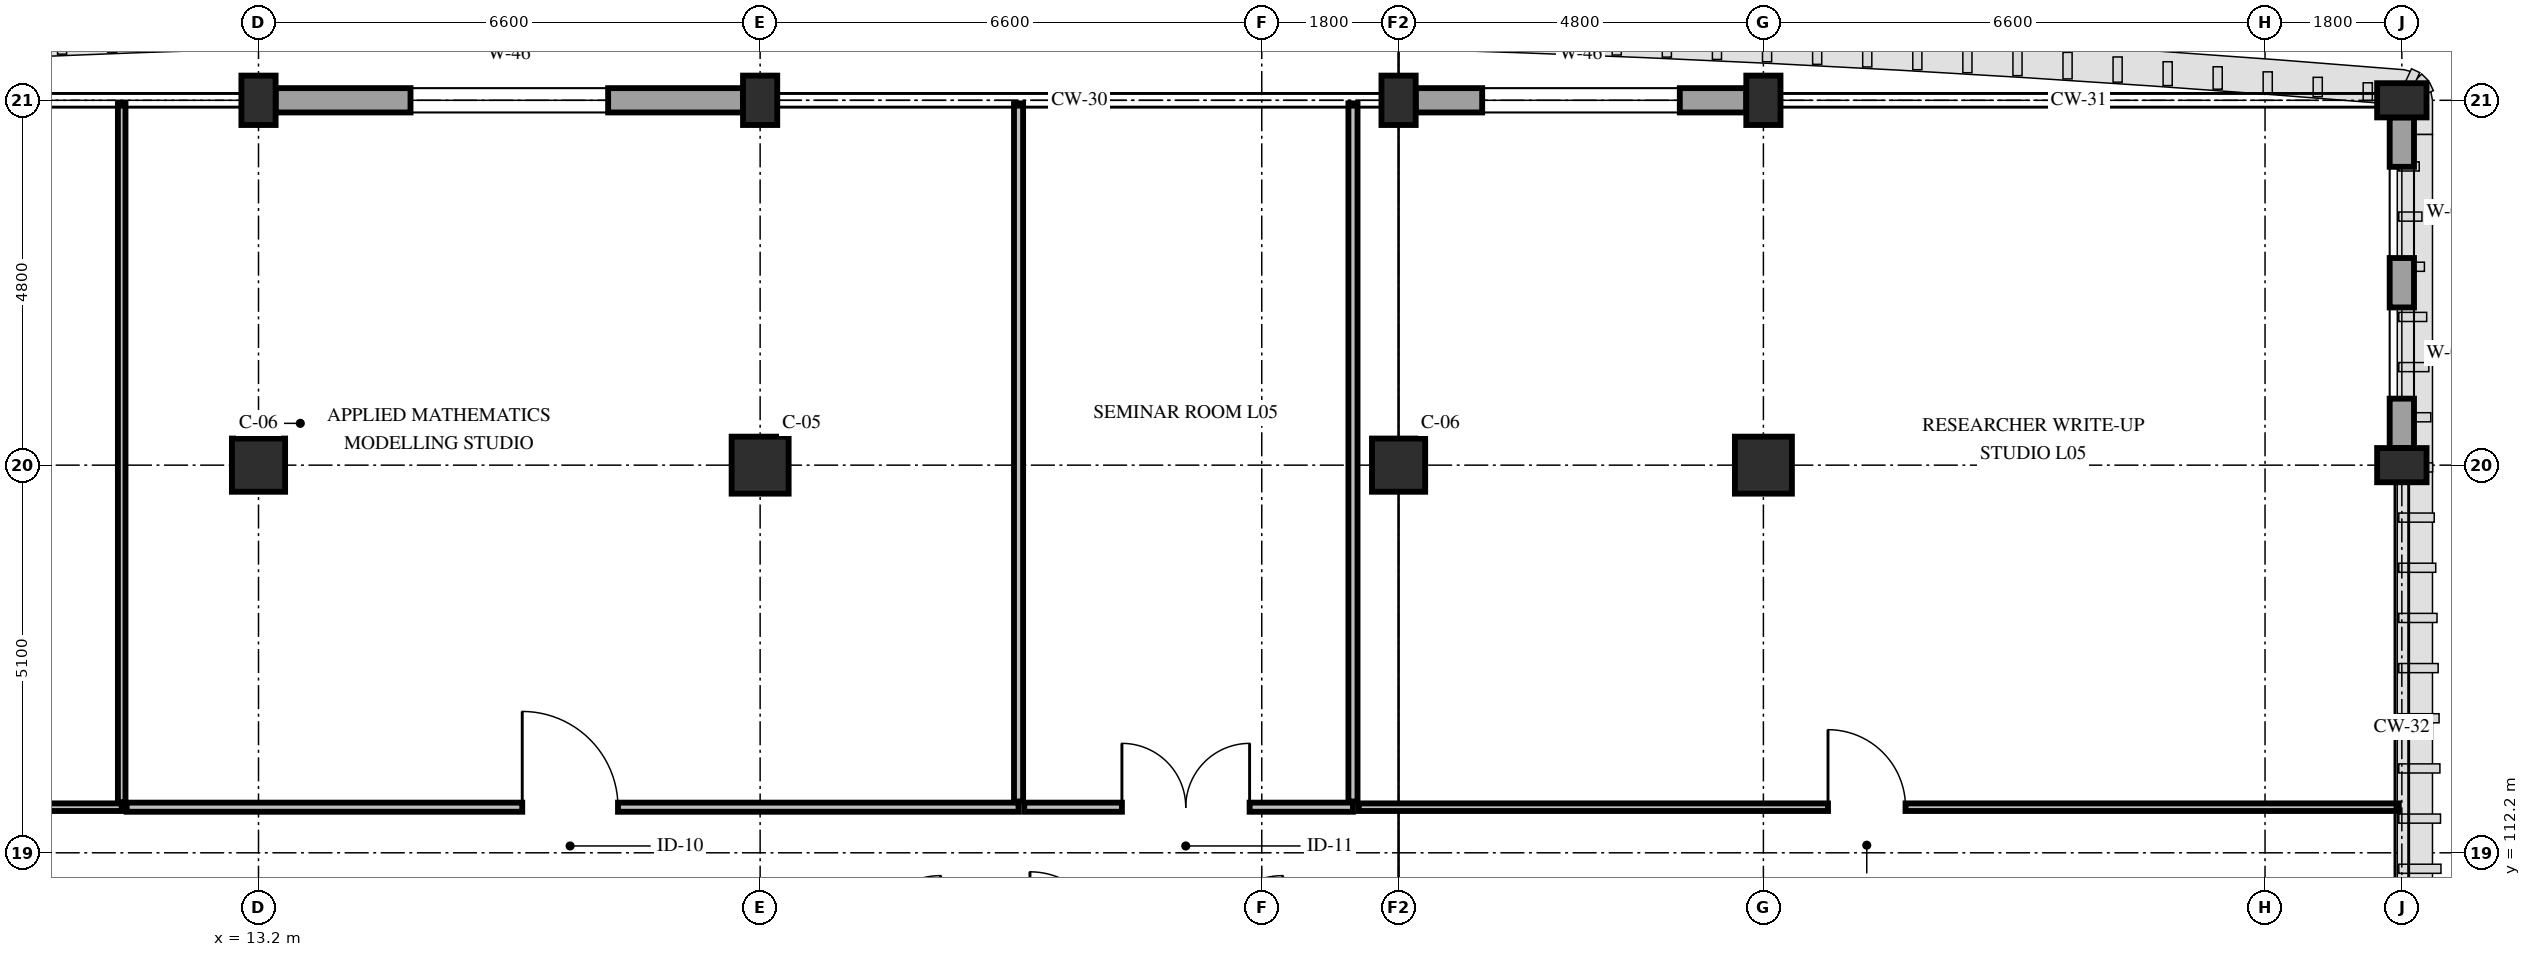
"""IFC4 building model, lengths in metres.
Left out: names, types, materials, properties, quantities, classifications, styles, units other than length and angle.
Written with IfcOpenShell. Run it as: python <this file> out.ifc"""

import sys

from ifc_helpers import new_model, si_unit, direction, frame, frame_2d, origin, origin_2d, place, context, subcontext, project, spatial, rectangle, extrude, element, fill, save


model = new_model("IFC4")
c1 = context("Model", 3, precision=1e-05, world=origin(), true_north=direction((0.0, 1.0)))
c2 = subcontext(c1, "Body", "Model", "MODEL_VIEW")
j1 = project(units=[si_unit("LENGTHUNIT", "METRE"), si_unit("PLANEANGLEUNIT", "RADIAN")], contexts=[c1])
p1 = place(None, origin())
s1 = spatial("IfcSite", under=j1, at=p1, CompositionType="ELEMENT")
p2 = place(p1, origin())
s2 = spatial("IfcBuilding", under=s1, at=p2, CompositionType="ELEMENT")
p3 = place(p2, frame((0.0, 0.0, 24.6)))
s3 = spatial("IfcBuildingStorey", under=s2, at=p3, CompositionType="ELEMENT", Elevation=24.6)
p4 = place(p3, frame((13.2, 117.3, 0.0), z_axis=(0.0, 0.0, 1.0), x_axis=(1.0, 0.0, 0.0)))
e1 = element("IfcColumn", 1, at=p4, inside=s3, PredefinedType="COLUMN", context=c2, shape_type="SweptSolid", body=[
    extrude(rectangle(XDim=0.7, YDim=0.7, at=origin_2d()), origin(), (0.0, 0.0, 1.0), 4.8),
])
p5 = place(p3, frame((13.2, 122.1, 0.0), z_axis=(0.0, 0.0, 1.0), x_axis=(1.0, 0.0, 0.0)))
e2 = element("IfcColumn", 2, at=p5, inside=s3, PredefinedType="PILASTER", context=c2, shape_type="SweptSolid", body=[
    extrude(rectangle(XDim=0.45, YDim=0.65, at=origin_2d()), origin(), (0.0, 0.0, 1.0), 4.8),
])
p6 = place(p3, frame((19.8, 117.3, 0.0), z_axis=(0.0, 0.0, 1.0), x_axis=(1.0, 0.0, 0.0)))
e3 = element("IfcColumn", 3, at=p6, inside=s3, PredefinedType="COLUMN", context=c2, shape_type="SweptSolid", body=[
    extrude(rectangle(XDim=0.75, YDim=0.75, at=origin_2d()), origin(), (0.0, 0.0, 1.0), 4.8),
])
p7 = place(p3, frame((19.8, 122.1, 0.0), z_axis=(0.0, 0.0, 1.0), x_axis=(1.0, 0.0, 0.0)))
e4 = element("IfcColumn", 4, at=p7, inside=s3, PredefinedType="PILASTER", context=c2, shape_type="SweptSolid", body=[
    extrude(rectangle(XDim=0.45, YDim=0.65, at=origin_2d()), origin(), (0.0, 0.0, 1.0), 4.8),
])
p8 = place(p3, frame((28.2, 117.3, 0.0), z_axis=(0.0, 0.0, 1.0), x_axis=(1.0, 0.0, 0.0)))
e5 = element("IfcColumn", 5, at=p8, inside=s3, PredefinedType="COLUMN", context=c2, shape_type="SweptSolid", body=[
    extrude(rectangle(XDim=0.7, YDim=0.7, at=origin_2d()), origin(), (0.0, 0.0, 1.0), 4.8),
])
p9 = place(p3, frame((28.2, 122.1, 0.0), z_axis=(0.0, 0.0, 1.0), x_axis=(1.0, 0.0, 0.0)))
e6 = element("IfcColumn", 6, at=p9, inside=s3, PredefinedType="PILASTER", context=c2, shape_type="SweptSolid", body=[
    extrude(rectangle(XDim=0.45, YDim=0.65, at=origin_2d()), origin(), (0.0, 0.0, 1.0), 4.8),
])
p10 = place(p3, frame((33.0, 117.3, 0.0), z_axis=(0.0, 0.0, 1.0), x_axis=(1.0, 0.0, 0.0)))
e7 = element("IfcColumn", 7, at=p10, inside=s3, PredefinedType="COLUMN", context=c2, shape_type="SweptSolid", body=[
    extrude(rectangle(XDim=0.75, YDim=0.75, at=origin_2d()), origin(), (0.0, 0.0, 1.0), 4.8),
])
for number, where, z_axis, x_axis in (
    (8, (33.0, 122.1, 0.0), (0.0, 0.0, 1.0), (1.0, 0.0, 0.0)),
    (9, (41.4, 117.3, 0.0), (0.0, 0.0, 1.0), (0.0, 1.0, 0.0)),
    (10, (41.4, 122.1, 0.0), (0.0, 0.0, 1.0), (0.0, 1.0, 0.0)),
):
    element("IfcColumn", number, at=place(p3, frame(where, z_axis=z_axis, x_axis=x_axis)), inside=s3, PredefinedType="PILASTER", context=c2, shape_type="SweptSolid", body=[
        extrude(rectangle(XDim=0.45, YDim=0.65, at=origin_2d()), origin(), (0.0, 0.0, 1.0), 4.8),
    ])
p11 = place(p3, frame((13.425, 122.1, 0.0), z_axis=(0.0, 0.0, 1.0), x_axis=(1.0, 0.0, 0.0)))
e11 = element("IfcWall", 11, at=p11, inside=s3, PredefinedType="STANDARD", context=c2, shape_type="SweptSolid", body=[
    extrude(rectangle(XDim=6.15, YDim=0.32, at=frame_2d((3.075, 0.0))), origin(), (0.0, 0.0, 1.0), 3.93),
])
p12 = place(p11, frame((1.775, 0.0, 0.85)))
e12 = element("IfcOpeningElement", 12, at=p12, cuts=e11, PredefinedType="OPENING", context=c2, shape_type="SweptSolid", body=[
    extrude(rectangle(XDim=2.6, YDim=2.08, at=frame_2d((1.3, 1.04))), frame((0.0, 0.175, 0.0), z_axis=(0.0, -1.0, 0.0), x_axis=(1.0, 0.0, 0.0)), (0.0, 0.0, 1.0), 0.35),
])
p13 = place(p3, frame((28.425, 122.1, 0.0), z_axis=(0.0, 0.0, 1.0), x_axis=(1.0, 0.0, 0.0)))
e13 = element("IfcWall", 13, at=p13, inside=s3, PredefinedType="STANDARD", context=c2, shape_type="SweptSolid", body=[
    extrude(rectangle(XDim=4.35, YDim=0.32, at=frame_2d((2.175, 0.0))), origin(), (0.0, 0.0, 1.0), 3.95),
])
p14 = place(p13, frame((0.875, 0.0, 0.85)))
e14 = element("IfcOpeningElement", 14, at=p14, cuts=e13, PredefinedType="OPENING", context=c2, shape_type="SweptSolid", body=[
    extrude(rectangle(XDim=2.6, YDim=2.08, at=frame_2d((1.3, 1.04))), frame((0.0, 0.175, 0.0), z_axis=(0.0, -1.0, 0.0), x_axis=(1.0, 0.0, 0.0)), (0.0, 0.0, 1.0), 0.35),
])
p15 = place(p3, frame((41.4, 121.875, 0.0), z_axis=(0.0, 0.0, 1.0), x_axis=(0.0, -1.0, 0.0)))
e15 = element("IfcWall", 15, at=p15, inside=s3, PredefinedType="STANDARD", context=c2, shape_type="SweptSolid", body=[
    extrude(rectangle(XDim=4.35, YDim=0.32, at=frame_2d((2.175, 0.0))), origin(), (0.0, 0.0, 1.0), 3.83),
])
p16 = place(p15, frame((0.65, 0.0, 0.85)))
e16 = element("IfcOpeningElement", 16, at=p16, cuts=e15, PredefinedType="OPENING", context=c2, shape_type="SweptSolid", body=[
    extrude(rectangle(XDim=1.2, YDim=1.5, at=frame_2d((0.6, 0.75))), frame((0.0, 0.175, 0.0), z_axis=(0.0, -1.0, 0.0), x_axis=(1.0, 0.0, 0.0)), (0.0, 0.0, 1.0), 0.35),
])
p17 = place(p15, frame((2.5, 0.0, 0.85)))
e17 = element("IfcOpeningElement", 17, at=p17, cuts=e15, PredefinedType="OPENING", context=c2, shape_type="SweptSolid", body=[
    extrude(rectangle(XDim=1.2, YDim=1.5, at=frame_2d((0.6, 0.75))), frame((0.0, 0.175, 0.0), z_axis=(0.0, -1.0, 0.0), x_axis=(1.0, 0.0, 0.0)), (0.0, 0.0, 1.0), 0.35),
])
p18 = place(p3, frame((4.865, 112.8, 0.0), z_axis=(0.0, 0.0, 1.0), x_axis=(1.0, 0.0, 0.0)))
e18 = element("IfcWall", 18, at=p18, inside=s3, PredefinedType="PARTITIONING", context=c2, shape_type="SweptSolid", body=[
    extrude(rectangle(XDim=6.535, YDim=0.1, at=frame_2d((3.268, 0.0))), origin(), (0.0, 0.0, 1.0), 4.13),
])
p19 = place(p18, frame((2.745, 0.0, 0.0)))
e19 = element("IfcOpeningElement", 19, at=p19, cuts=e18, PredefinedType="OPENING", context=c2, shape_type="SweptSolid", body=[
    extrude(rectangle(XDim=0.98, YDim=2.2, at=frame_2d((0.49, 1.1))), frame((0.0, 0.065, 0.0), z_axis=(0.0, -1.0, 0.0), x_axis=(1.0, 0.0, 0.0)), (0.0, 0.0, 1.0), 0.13),
])
p20 = place(p3, frame((11.4, 112.865, 0.0), z_axis=(0.0, 0.0, 1.0), x_axis=(0.0, 1.0, 0.0)))
e20 = element("IfcWall", 20, at=p20, inside=s3, PredefinedType="PARTITIONING", context=c2, shape_type="SweptSolid", body=[
    extrude(rectangle(XDim=9.195, YDim=0.1, at=frame_2d((4.598, 0.0))), origin(), (0.0, 0.0, 1.0), 3.83),
])
p21 = place(p3, frame((11.465, 112.8, 0.0), z_axis=(0.0, 0.0, 1.0), x_axis=(1.0, 0.0, 0.0)))
e21 = element("IfcWall", 21, at=p21, inside=s3, PredefinedType="PARTITIONING", context=c2, shape_type="SweptSolid", body=[
    extrude(rectangle(XDim=11.735, YDim=0.12, at=frame_2d((5.867, 0.0))), origin(), (0.0, 0.0, 1.0), 4.13),
])
p22 = place(p21, frame((5.205, 0.0, 0.0)))
e22 = element("IfcOpeningElement", 22, at=p22, cuts=e21, PredefinedType="OPENING", context=c2, shape_type="SweptSolid", body=[
    extrude(rectangle(XDim=1.26, YDim=2.2, at=frame_2d((0.63, 1.1))), frame((0.0, 0.075, 0.0), z_axis=(0.0, -1.0, 0.0), x_axis=(1.0, 0.0, 0.0)), (0.0, 0.0, 1.0), 0.15),
])
p23 = place(p3, frame((23.2, 112.875, 0.0), z_axis=(0.0, 0.0, 1.0), x_axis=(0.0, 1.0, 0.0)))
e23 = element("IfcWall", 23, at=p23, inside=s3, PredefinedType="PARTITIONING", context=c2, shape_type="SweptSolid", body=[
    extrude(rectangle(XDim=9.185, YDim=0.12, at=frame_2d((4.593, 0.0))), origin(), (0.0, 0.0, 1.0), 3.83),
])
p24 = place(p3, frame((23.275, 112.8, 0.0), z_axis=(0.0, 0.0, 1.0), x_axis=(1.0, 0.0, 0.0)))
e24 = element("IfcWall", 24, at=p24, inside=s3, PredefinedType="PARTITIONING", context=c2, shape_type="SweptSolid", body=[
    extrude(rectangle(XDim=4.325, YDim=0.12, at=frame_2d((2.163, 0.0))), origin(), (0.0, 0.0, 1.0), 4.345),
])
p25 = place(p24, frame((1.285, 0.0, 0.0)))
e25 = element("IfcOpeningElement", 25, at=p25, cuts=e24, PredefinedType="OPENING", context=c2, shape_type="SweptSolid", body=[
    extrude(rectangle(XDim=1.68, YDim=2.3, at=frame_2d((0.84, 1.15))), frame((0.0, 0.075, 0.0), z_axis=(0.0, -1.0, 0.0), x_axis=(1.0, 0.0, 0.0)), (0.0, 0.0, 1.0), 0.15),
])
p26 = place(p3, frame((27.6, 112.875, 0.0), z_axis=(0.0, 0.0, 1.0), x_axis=(0.0, 1.0, 0.0)))
e26 = element("IfcWall", 26, at=p26, inside=s3, PredefinedType="PARTITIONING", context=c2, shape_type="SweptSolid", body=[
    extrude(rectangle(XDim=9.185, YDim=0.12, at=frame_2d((4.593, 0.0))), origin(), (0.0, 0.0, 1.0), 3.83),
])
p27 = place(p3, frame((27.675, 112.8, 0.0), z_axis=(0.0, 0.0, 1.0), x_axis=(1.0, 0.0, 0.0)))
e27 = element("IfcWall", 27, at=p27, inside=s3, PredefinedType="PARTITIONING", context=c2, shape_type="SweptSolid", body=[
    extrude(rectangle(XDim=13.685, YDim=0.1, at=frame_2d((6.843, 0.0))), origin(), (0.0, 0.0, 1.0), 4.08),
])
p28 = place(p27, frame((6.175, 0.0, 0.0)))
e28 = element("IfcOpeningElement", 28, at=p28, cuts=e27, PredefinedType="OPENING", context=c2, shape_type="SweptSolid", body=[
    extrude(rectangle(XDim=1.02, YDim=2.2, at=frame_2d((0.51, 1.1))), frame((0.0, 0.065, 0.0), z_axis=(0.0, -1.0, 0.0), x_axis=(1.0, 0.0, 0.0)), (0.0, 0.0, 1.0), 0.13),
])
p29 = place(p12, origin())
e29 = element("IfcWindow", 29, at=p29, inside=s3, PartitioningType="DOUBLE_PANEL_VERTICAL", PredefinedType="WINDOW", context=c2, shape_type="SweptSolid", body=[
    extrude(rectangle(XDim=2.6, YDim=2.08, at=frame_2d((1.3, 1.04))), frame((0.0, 0.03, 0.0), z_axis=(0.0, -1.0, 0.0), x_axis=(1.0, 0.0, 0.0)), (0.0, 0.0, 1.0), 0.06),
])
fill(e12, e29)
p30 = place(p14, origin())
e30 = element("IfcWindow", 30, at=p30, inside=s3, PartitioningType="DOUBLE_PANEL_VERTICAL", PredefinedType="WINDOW", context=c2, shape_type="SweptSolid", body=[
    extrude(rectangle(XDim=2.6, YDim=2.08, at=frame_2d((1.3, 1.04))), frame((0.0, 0.03, 0.0), z_axis=(0.0, -1.0, 0.0), x_axis=(1.0, 0.0, 0.0)), (0.0, 0.0, 1.0), 0.06),
])
fill(e14, e30)
p31 = place(p16, origin())
e31 = element("IfcWindow", 31, at=p31, inside=s3, PartitioningType="SINGLE_PANEL", PredefinedType="WINDOW", context=c2, shape_type="SweptSolid", body=[
    extrude(rectangle(XDim=1.2, YDim=1.5, at=frame_2d((0.6, 0.75))), frame((0.0, 0.03, 0.0), z_axis=(0.0, -1.0, 0.0), x_axis=(1.0, 0.0, 0.0)), (0.0, 0.0, 1.0), 0.06),
])
fill(e16, e31)
p32 = place(p17, origin())
e32 = element("IfcWindow", 32, at=p32, inside=s3, PartitioningType="SINGLE_PANEL", PredefinedType="WINDOW", context=c2, shape_type="SweptSolid", body=[
    extrude(rectangle(XDim=1.2, YDim=1.5, at=frame_2d((0.6, 0.75))), frame((0.0, 0.03, 0.0), z_axis=(0.0, -1.0, 0.0), x_axis=(1.0, 0.0, 0.0)), (0.0, 0.0, 1.0), 0.06),
])
fill(e17, e32)
p33 = place(p22, origin())
e33 = element("IfcDoor", 33, at=p33, inside=s3, OperationType="SINGLE_SWING_LEFT", PredefinedType="DOOR", context=c2, shape_type="SweptSolid", body=[
    extrude(rectangle(XDim=1.26, YDim=2.2, at=frame_2d((0.63, 1.1))), frame((0.0, 0.025, 0.0), z_axis=(0.0, -1.0, 0.0), x_axis=(1.0, 0.0, 0.0)), (0.0, 0.0, 1.0), 0.05),
])
fill(e22, e33)
p34 = place(p25, origin())
e34 = element("IfcDoor", 34, at=p34, inside=s3, OperationType="DOUBLE_DOOR_SINGLE_SWING", PredefinedType="DOOR", context=c2, shape_type="SweptSolid", body=[
    extrude(rectangle(XDim=1.68, YDim=2.3, at=frame_2d((0.84, 1.15))), frame((0.0, 0.025, 0.0), z_axis=(0.0, -1.0, 0.0), x_axis=(1.0, 0.0, 0.0)), (0.0, 0.0, 1.0), 0.05),
])
fill(e25, e34)
p35 = place(p28, origin())
e35 = element("IfcDoor", 35, at=p35, inside=s3, OperationType="SINGLE_SWING_LEFT", PredefinedType="DOOR", context=c2, shape_type="SweptSolid", body=[
    extrude(rectangle(XDim=1.02, YDim=2.2, at=frame_2d((0.51, 1.1))), frame((0.0, 0.025, 0.0), z_axis=(0.0, -1.0, 0.0), x_axis=(1.0, 0.0, 0.0)), (0.0, 0.0, 1.0), 0.05),
])
fill(e28, e35)
save(model, sys.argv[1])
